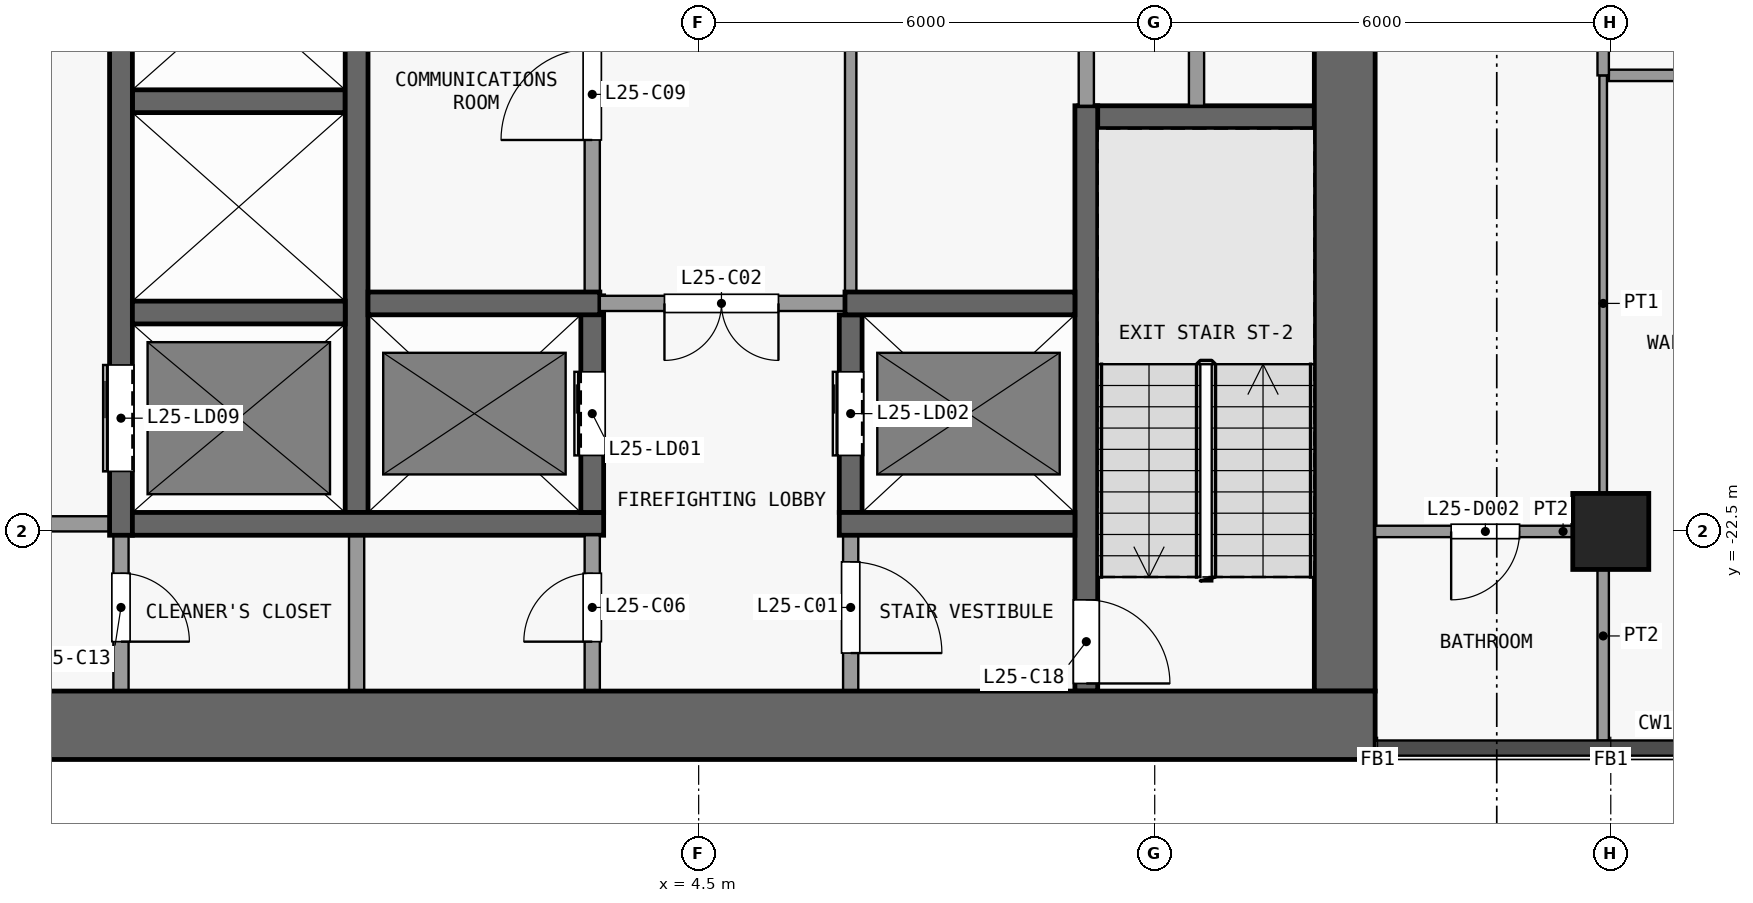
"""IFC4 building model, lengths in metres.
Left out: names, types, materials, properties, quantities, classifications, styles, units other than length and angle.
Written with IfcOpenShell. Run it as: python <this file> out.ifc"""

import sys

from ifc_helpers import new_model, si_unit, direction, frame, frame_2d, origin, origin_2d, place, context, subcontext, project, spatial, rectangle, extrude, element, fill, save


model = new_model("IFC4")
c1 = context("Model", 3, precision=1e-05, world=origin(), true_north=direction((0.0, 1.0)))
c2 = subcontext(c1, "Body", "Model", "MODEL_VIEW")
j1 = project(units=[si_unit("LENGTHUNIT", "METRE"), si_unit("PLANEANGLEUNIT", "RADIAN")], contexts=[c1])
p1 = place(None, origin())
s1 = spatial("IfcSite", under=j1, at=p1, CompositionType="ELEMENT")
p2 = place(p1, origin())
s2 = spatial("IfcBuilding", under=s1, at=p2, CompositionType="ELEMENT")
p3 = place(p2, frame((0.0, 0.0, 102.7)))
s3 = spatial("IfcBuildingStorey", under=s2, at=p3, CompositionType="ELEMENT", Elevation=102.7)
p4 = place(p3, frame((16.5, -22.5, 0.0), z_axis=(0.0, 0.0, 1.0), x_axis=(1.0, 0.0, 0.0)))
e1 = element("IfcColumn", 1, at=p4, inside=s3, PredefinedType="COLUMN", context=c2, shape_type="SweptSolid", body=[
    extrude(rectangle(XDim=1.0, YDim=1.0, at=origin_2d()), origin(), (0.0, 0.0, 1.0), 3.6),
])
p5 = place(p3, frame((-13.4, -25.05, 0.0), z_axis=(0.0, 0.0, 1.0), x_axis=(1.0, 0.0, 0.0)))
e2 = element("IfcWall", 2, at=p5, inside=s3, PredefinedType="SHEAR", context=c2, shape_type="SweptSolid", body=[
    extrude(rectangle(XDim=26.8, YDim=0.9, at=frame_2d((13.4, 0.0))), origin(), (0.0, 0.0, 1.0), 3.3),
])
p6 = place(p3, frame((13.0, -24.6, 0.0), z_axis=(0.0, 0.0, 1.0), x_axis=(0.0, 1.0, 0.0)))
e3 = element("IfcWall", 3, at=p6, inside=s3, PredefinedType="SHEAR", context=c2, shape_type="SweptSolid", body=[
    extrude(rectangle(XDim=16.1, YDim=0.8, at=frame_2d((8.05, 0.0))), origin(), (0.0, 0.0, 1.0), 3.3),
])
p7 = place(p3, frame((-3.25, -22.4, 0.0), z_axis=(0.0, 0.0, 1.0), x_axis=(-1.0, 0.0, 0.0)))
e4 = element("IfcWall", 4, at=p7, inside=s3, PredefinedType="PARTITIONING", context=c2, shape_type="SweptSolid", body=[
    extrude(rectangle(XDim=3.1, YDim=0.2, at=frame_2d((1.55, 0.0))), origin(), (0.0, 0.0, 1.0), 3.3),
])
p8 = place(p7, frame((0.8, 0.0, 0.0)))
e5 = element("IfcOpeningElement", 5, at=p8, cuts=e4, PredefinedType="OPENING", context=c2, shape_type="SweptSolid", body=[
    extrude(rectangle(XDim=1.5, YDim=2.1, at=frame_2d((0.75, 1.05))), frame((0.0, 0.11, 0.0), z_axis=(0.0, -1.0, 0.0), x_axis=(1.0, 0.0, 0.0)), (0.0, 0.0, 1.0), 0.22),
])
p9 = place(p3, frame((-2.95, -22.4, 0.0), z_axis=(0.0, 0.0, 1.0), x_axis=(1.0, 0.0, 0.0)))
e6 = element("IfcWall", 6, at=p9, inside=s3, PredefinedType="SHEAR", context=c2, shape_type="SweptSolid", body=[
    extrude(rectangle(XDim=6.2, YDim=0.3, at=frame_2d((3.1, 0.0))), origin(), (0.0, 0.0, 1.0), 3.3),
])
p10 = place(p3, frame((6.35, -22.4, 0.0), z_axis=(0.0, 0.0, 1.0), x_axis=(1.0, 0.0, 0.0)))
e7 = element("IfcWall", 7, at=p10, inside=s3, PredefinedType="SHEAR", context=c2, shape_type="SweptSolid", body=[
    extrude(rectangle(XDim=3.1, YDim=0.3, at=frame_2d((1.55, 0.0))), origin(), (0.0, 0.0, 1.0), 3.3),
])
p11 = place(p3, frame((-2.95, -19.62, 0.0), z_axis=(0.0, 0.0, 1.0), x_axis=(1.0, 0.0, 0.0)))
e8 = element("IfcWall", 8, at=p11, inside=s3, PredefinedType="SHEAR", context=c2, shape_type="SweptSolid", body=[
    extrude(rectangle(XDim=2.8, YDim=0.3, at=frame_2d((1.4, 0.0))), origin(), (0.0, 0.0, 1.0), 3.3),
])
p12 = place(p3, frame((0.15, -19.5, 0.0), z_axis=(0.0, 0.0, 1.0), x_axis=(1.0, 0.0, 0.0)))
e9 = element("IfcWall", 9, at=p12, inside=s3, PredefinedType="SHEAR", context=c2, shape_type="SweptSolid", body=[
    extrude(rectangle(XDim=3.05, YDim=0.3, at=frame_2d((1.525, 0.0))), origin(), (0.0, 0.0, 1.0), 3.3),
])
p13 = place(p3, frame((6.575, -19.5, 0.0), z_axis=(0.0, 0.0, 1.0), x_axis=(-1.0, 0.0, 0.0)))
e10 = element("IfcWall", 10, at=p13, inside=s3, PredefinedType="PARTITIONING", context=c2, shape_type="SweptSolid", body=[
    extrude(rectangle(XDim=3.375, YDim=0.2, at=frame_2d((1.688, 0.0))), origin(), (0.0, 0.0, 1.0), 3.3),
])
p14 = place(p13, frame((1.025, 0.0, 0.0)))
e11 = element("IfcOpeningElement", 11, at=p14, cuts=e10, PredefinedType="OPENING", context=c2, shape_type="SweptSolid", body=[
    extrude(rectangle(XDim=1.5, YDim=2.1, at=frame_2d((0.75, 1.05))), frame((0.0, 0.11, 0.0), z_axis=(0.0, -1.0, 0.0), x_axis=(1.0, 0.0, 0.0)), (0.0, 0.0, 1.0), 0.22),
])
p15 = place(p3, frame((6.425, -19.5, 0.0), z_axis=(0.0, 0.0, 1.0), x_axis=(1.0, 0.0, 0.0)))
e12 = element("IfcWall", 12, at=p15, inside=s3, PredefinedType="SHEAR", context=c2, shape_type="SweptSolid", body=[
    extrude(rectangle(XDim=3.025, YDim=0.3, at=frame_2d((1.512, 0.0))), origin(), (0.0, 0.0, 1.0), 3.3),
])
p16 = place(p3, frame((9.5, -17.05, 0.0), z_axis=(0.0, 0.0, 1.0), x_axis=(1.0, 0.0, 0.0)))
e13 = element("IfcWall", 13, at=p16, inside=s3, PredefinedType="SHEAR", context=c2, shape_type="SweptSolid", body=[
    extrude(rectangle(XDim=3.1, YDim=0.3, at=frame_2d((1.55, 0.0))), origin(), (0.0, 0.0, 1.0), 3.3),
])
p17 = place(p3, frame((-2.95, -16.84, 0.0), z_axis=(0.0, 0.0, 1.0), x_axis=(1.0, 0.0, 0.0)))
e14 = element("IfcWall", 14, at=p17, inside=s3, PredefinedType="SHEAR", context=c2, shape_type="SweptSolid", body=[
    extrude(rectangle(XDim=2.8, YDim=0.3, at=frame_2d((1.4, 0.0))), origin(), (0.0, 0.0, 1.0), 3.3),
])
p18 = place(p3, frame((-3.1, -22.55, 0.0), z_axis=(0.0, 0.0, 1.0), x_axis=(0.0, -1.0, 0.0)))
e15 = element("IfcWall", 15, at=p18, inside=s3, PredefinedType="PARTITIONING", context=c2, shape_type="SweptSolid", body=[
    extrude(rectangle(XDim=2.05, YDim=0.2, at=frame_2d((1.025, 0.0))), origin(), (0.0, 0.0, 1.0), 3.3),
])
p19 = place(p18, frame((0.5, 0.0, 0.0)))
e16 = element("IfcOpeningElement", 16, at=p19, cuts=e15, PredefinedType="OPENING", context=c2, shape_type="SweptSolid", body=[
    extrude(rectangle(XDim=0.9, YDim=2.1, at=frame_2d((0.45, 1.05))), frame((0.0, 0.11, 0.0), z_axis=(0.0, -1.0, 0.0), x_axis=(1.0, 0.0, 0.0)), (0.0, 0.0, 1.0), 0.22),
])
p20 = place(p3, frame((-3.1, -22.55, 0.0), z_axis=(0.0, 0.0, 1.0), x_axis=(0.0, 1.0, 0.0)))
e17 = element("IfcWall", 17, at=p20, inside=s3, PredefinedType="SHEAR", context=c2, shape_type="SweptSolid", body=[
    extrude(rectangle(XDim=14.05, YDim=0.3, at=frame_2d((7.025, 0.0))), origin(), (0.0, 0.0, 1.0), 3.3),
])
p21 = place(p20, frame((12.11, 0.0, 0.0)))
e18 = element("IfcOpeningElement", 18, at=p21, cuts=e17, PredefinedType="OPENING", context=c2, shape_type="SweptSolid", body=[
    extrude(rectangle(XDim=1.1, YDim=2.1, at=frame_2d((0.55, 1.05))), frame((0.0, 0.16, 0.0), z_axis=(0.0, -1.0, 0.0), x_axis=(1.0, 0.0, 0.0)), (0.0, 0.0, 1.0), 0.32),
])
p22 = place(p20, frame((0.84, 0.0, 0.0)))
e19 = element("IfcOpeningElement", 19, at=p22, cuts=e17, PredefinedType="OPENING", context=c2, shape_type="SweptSolid", body=[
    extrude(rectangle(XDim=1.4, YDim=2.1, at=frame_2d((0.7, 1.05))), frame((0.0, 0.16, 0.0), z_axis=(0.0, -1.0, 0.0), x_axis=(1.0, 0.0, 0.0)), (0.0, 0.0, 1.0), 0.32),
])
p23 = place(p3, frame((0.0, -24.6, 0.0), z_axis=(0.0, 0.0, 1.0), x_axis=(0.0, 1.0, 0.0)))
e20 = element("IfcWall", 20, at=p23, inside=s3, PredefinedType="PARTITIONING", context=c2, shape_type="SweptSolid", body=[
    extrude(rectangle(XDim=2.05, YDim=0.2, at=frame_2d((1.025, 0.0))), origin(), (0.0, 0.0, 1.0), 3.3),
])
p24 = place(p3, frame((0.0, -22.25, 0.0), z_axis=(0.0, 0.0, 1.0), x_axis=(0.0, 1.0, 0.0)))
e21 = element("IfcWall", 21, at=p24, inside=s3, PredefinedType="SHEAR", context=c2, shape_type="SweptSolid", body=[
    extrude(rectangle(XDim=13.75, YDim=0.3, at=frame_2d((6.875, 0.0))), origin(), (0.0, 0.0, 1.0), 3.3),
])
p25 = place(p3, frame((3.1, -24.6, 0.0), z_axis=(0.0, 0.0, 1.0), x_axis=(0.0, 1.0, 0.0)))
e22 = element("IfcWall", 22, at=p25, inside=s3, PredefinedType="PARTITIONING", context=c2, shape_type="SweptSolid", body=[
    extrude(rectangle(XDim=2.05, YDim=0.2, at=frame_2d((1.025, 0.0))), origin(), (0.0, 0.0, 1.0), 3.3),
])
p26 = place(p25, frame((0.65, 0.0, 0.0)))
e23 = element("IfcOpeningElement", 23, at=p26, cuts=e22, PredefinedType="OPENING", context=c2, shape_type="SweptSolid", body=[
    extrude(rectangle(XDim=0.9, YDim=2.1, at=frame_2d((0.45, 1.05))), frame((0.0, 0.11, 0.0), z_axis=(0.0, -1.0, 0.0), x_axis=(1.0, 0.0, 0.0)), (0.0, 0.0, 1.0), 0.22),
])
p27 = place(p3, frame((3.1, -22.25, 0.0), z_axis=(0.0, 0.0, 1.0), x_axis=(0.0, 1.0, 0.0)))
e24 = element("IfcWall", 24, at=p27, inside=s3, PredefinedType="SHEAR", context=c2, shape_type="SweptSolid", body=[
    extrude(rectangle(XDim=2.85, YDim=0.3, at=frame_2d((1.425, 0.0))), origin(), (0.0, 0.0, 1.0), 3.3),
])
p28 = place(p27, frame((0.75, 0.0, 0.0)))
e25 = element("IfcOpeningElement", 25, at=p28, cuts=e24, PredefinedType="OPENING", context=c2, shape_type="SweptSolid", body=[
    extrude(rectangle(XDim=1.1, YDim=2.1, at=frame_2d((0.55, 1.05))), frame((0.0, 0.16, 0.0), z_axis=(0.0, -1.0, 0.0), x_axis=(1.0, 0.0, 0.0)), (0.0, 0.0, 1.0), 0.32),
])
p29 = place(p3, frame((3.1, -19.6, 0.0), z_axis=(0.0, 0.0, 1.0), x_axis=(0.0, 1.0, 0.0)))
e26 = element("IfcWall", 26, at=p29, inside=s3, PredefinedType="PARTITIONING", context=c2, shape_type="SweptSolid", body=[
    extrude(rectangle(XDim=11.1, YDim=0.2, at=frame_2d((5.55, 0.0))), origin(), (0.0, 0.0, 1.0), 3.3),
])
p30 = place(p29, frame((2.25, 0.0, 0.0)))
e27 = element("IfcOpeningElement", 27, at=p30, cuts=e26, PredefinedType="OPENING", context=c2, shape_type="SweptSolid", body=[
    extrude(rectangle(XDim=1.2, YDim=2.1, at=frame_2d((0.6, 1.05))), frame((0.0, 0.11, 0.0), z_axis=(0.0, -1.0, 0.0), x_axis=(1.0, 0.0, 0.0)), (0.0, 0.0, 1.0), 0.22),
])
p31 = place(p29, frame((7.75, 0.0, 0.0)))
e28 = element("IfcOpeningElement", 28, at=p31, cuts=e26, PredefinedType="OPENING", context=c2, shape_type="SweptSolid", body=[
    extrude(rectangle(XDim=1.2, YDim=2.1, at=frame_2d((0.6, 1.05))), frame((0.0, 0.11, 0.0), z_axis=(0.0, -1.0, 0.0), x_axis=(1.0, 0.0, 0.0)), (0.0, 0.0, 1.0), 0.22),
])
p32 = place(p3, frame((6.5, -22.55, 0.0), z_axis=(0.0, 0.0, 1.0), x_axis=(0.0, -1.0, 0.0)))
e29 = element("IfcWall", 29, at=p32, inside=s3, PredefinedType="PARTITIONING", context=c2, shape_type="SweptSolid", body=[
    extrude(rectangle(XDim=2.05, YDim=0.2, at=frame_2d((1.025, 0.0))), origin(), (0.0, 0.0, 1.0), 3.3),
])
p33 = place(p32, frame((0.35, 0.0, 0.0)))
e30 = element("IfcOpeningElement", 30, at=p33, cuts=e29, PredefinedType="OPENING", context=c2, shape_type="SweptSolid", body=[
    extrude(rectangle(XDim=1.2, YDim=2.1, at=frame_2d((0.6, 1.05))), frame((0.0, 0.11, 0.0), z_axis=(0.0, -1.0, 0.0), x_axis=(1.0, 0.0, 0.0)), (0.0, 0.0, 1.0), 0.22),
])
p34 = place(p3, frame((6.5, -22.25, 0.0), z_axis=(0.0, 0.0, 1.0), x_axis=(0.0, 1.0, 0.0)))
e31 = element("IfcWall", 31, at=p34, inside=s3, PredefinedType="SHEAR", context=c2, shape_type="SweptSolid", body=[
    extrude(rectangle(XDim=2.6, YDim=0.3, at=frame_2d((1.3, 0.0))), origin(), (0.0, 0.0, 1.0), 3.3),
])
p35 = place(p34, frame((0.75, 0.0, 0.0)))
e32 = element("IfcOpeningElement", 32, at=p35, cuts=e31, PredefinedType="OPENING", context=c2, shape_type="SweptSolid", body=[
    extrude(rectangle(XDim=1.1, YDim=2.1, at=frame_2d((0.55, 1.05))), frame((0.0, 0.16, 0.0), z_axis=(0.0, -1.0, 0.0), x_axis=(1.0, 0.0, 0.0)), (0.0, 0.0, 1.0), 0.32),
])
p36 = place(p3, frame((6.5, -8.5, 0.0), z_axis=(0.0, 0.0, 1.0), x_axis=(0.0, -1.0, 0.0)))
e33 = element("IfcWall", 33, at=p36, inside=s3, PredefinedType="PARTITIONING", context=c2, shape_type="SweptSolid", body=[
    extrude(rectangle(XDim=10.85, YDim=0.15, at=frame_2d((5.425, 0.0))), origin(), (0.0, 0.0, 1.0), 3.3),
])
p37 = place(p36, frame((4.9, 0.0, 0.0)))
e34 = element("IfcOpeningElement", 34, at=p37, cuts=e33, PredefinedType="OPENING", context=c2, shape_type="SweptSolid", body=[
    extrude(rectangle(XDim=1.2, YDim=2.1, at=frame_2d((0.6, 1.05))), frame((0.0, 0.085, 0.0), z_axis=(0.0, -1.0, 0.0), x_axis=(1.0, 0.0, 0.0)), (0.0, 0.0, 1.0), 0.17),
])
p38 = place(p3, frame((9.6, -16.9, 0.0), z_axis=(0.0, 0.0, 1.0), x_axis=(0.0, -1.0, 0.0)))
e35 = element("IfcWall", 35, at=p38, inside=s3, PredefinedType="SHEAR", context=c2, shape_type="SweptSolid", body=[
    extrude(rectangle(XDim=7.7, YDim=0.3, at=frame_2d((3.85, 0.0))), origin(), (0.0, 0.0, 1.0), 3.3),
])
p39 = place(p38, frame((6.5, 0.0, 0.0)))
e36 = element("IfcOpeningElement", 36, at=p39, cuts=e35, PredefinedType="OPENING", context=c2, shape_type="SweptSolid", body=[
    extrude(rectangle(XDim=1.1, YDim=2.1, at=frame_2d((0.55, 1.05))), frame((0.0, 0.16, 0.0), z_axis=(0.0, -1.0, 0.0), x_axis=(1.0, 0.0, 0.0)), (0.0, 0.0, 1.0), 0.32),
])
p40 = place(p3, frame((9.6, -16.9, 0.0), z_axis=(0.0, 0.0, 1.0), x_axis=(0.0, 1.0, 0.0)))
e37 = element("IfcWall", 37, at=p40, inside=s3, PredefinedType="PARTITIONING", context=c2, shape_type="SweptSolid", body=[
    extrude(rectangle(XDim=8.4, YDim=0.2, at=frame_2d((4.2, 0.0))), origin(), (0.0, 0.0, 1.0), 3.3),
])
p41 = place(p3, frame((11.05, -13.2, 0.0), z_axis=(0.0, 0.0, 1.0), x_axis=(0.0, -1.0, 0.0)))
e38 = element("IfcWall", 38, at=p41, inside=s3, PredefinedType="PARTITIONING", context=c2, shape_type="SweptSolid", body=[
    extrude(rectangle(XDim=3.7, YDim=0.2, at=frame_2d((1.85, 0.0))), origin(), (0.0, 0.0, 1.0), 3.3),
])
p42 = place(p41, frame((1.525, 0.0, 0.0)))
e39 = element("IfcOpeningElement", 39, at=p42, cuts=e38, PredefinedType="OPENING", context=c2, shape_type="SweptSolid", body=[
    extrude(rectangle(XDim=0.9, YDim=2.1, at=frame_2d((0.45, 1.05))), frame((0.0, 0.11, 0.0), z_axis=(0.0, -1.0, 0.0), x_axis=(1.0, 0.0, 0.0)), (0.0, 0.0, 1.0), 0.22),
])
p43 = place(p3, frame((13.4, -22.5, 0.0), z_axis=(0.0, 0.0, 1.0), x_axis=(1.0, 0.0, 0.0)))
e40 = element("IfcWall", 40, at=p43, inside=s3, PredefinedType="PARTITIONING", context=c2, shape_type="SweptSolid", body=[
    extrude(rectangle(XDim=2.925, YDim=0.15, at=frame_2d((1.462, 0.0))), origin(), (0.0, 0.0, 1.0), 3.3),
])
p44 = place(p43, frame((1.0, 0.0, 0.0)))
e41 = element("IfcOpeningElement", 41, at=p44, cuts=e40, PredefinedType="OPENING", context=c2, shape_type="SweptSolid", body=[
    extrude(rectangle(XDim=0.9, YDim=2.1, at=frame_2d((0.45, 1.05))), frame((0.0, 0.085, 0.0), z_axis=(0.0, -1.0, 0.0), x_axis=(1.0, 0.0, 0.0)), (0.0, 0.0, 1.0), 0.17),
])
p45 = place(p3, frame((16.475, -16.5, 0.0), z_axis=(0.0, 0.0, 1.0), x_axis=(1.0, 0.0, 0.0)))
e42 = element("IfcWall", 42, at=p45, inside=s3, PredefinedType="PARTITIONING", context=c2, shape_type="SweptSolid", body=[
    extrude(rectangle(XDim=3.45, YDim=0.15, at=frame_2d((1.725, 0.0))), origin(), (0.0, 0.0, 1.0), 3.3),
])
p46 = place(p3, frame((16.4, -22.5, 0.0), z_axis=(0.0, 0.0, 1.0), x_axis=(0.0, 1.0, 0.0)))
e43 = element("IfcWall", 43, at=p46, inside=s3, PredefinedType="PARTITIONING", context=c2, shape_type="SweptSolid", body=[
    extrude(rectangle(XDim=6.0, YDim=0.1, at=frame_2d((3.0, 0.0))), origin(), (0.0, 0.0, 1.0), 3.3),
])
p47 = place(p3, frame((16.4, -25.25, 0.0), z_axis=(0.0, 0.0, 1.0), x_axis=(0.0, 1.0, 0.0)))
e44 = element("IfcWall", 44, at=p47, inside=s3, PredefinedType="PARTITIONING", context=c2, shape_type="SweptSolid", body=[
    extrude(rectangle(XDim=2.75, YDim=0.15, at=frame_2d((1.375, 0.0))), origin(), (0.0, 0.0, 1.0), 3.3),
])
p48 = place(p3, frame((16.4, -16.5, 0.0), z_axis=(0.0, 0.0, 1.0), x_axis=(0.0, 1.0, 0.0)))
e45 = element("IfcWall", 45, at=p48, inside=s3, PredefinedType="PARTITIONING", context=c2, shape_type="SweptSolid", body=[
    extrude(rectangle(XDim=8.5, YDim=0.15, at=frame_2d((4.25, 0.0))), origin(), (0.0, 0.0, 1.0), 3.3),
])
p49 = place(p48, frame((5.3, 0.0, 0.0)))
e46 = element("IfcOpeningElement", 46, at=p49, cuts=e45, PredefinedType="OPENING", context=c2, shape_type="SweptSolid", body=[
    extrude(rectangle(XDim=0.9, YDim=2.1, at=frame_2d((0.45, 1.05))), frame((0.0, 0.085, 0.0), z_axis=(0.0, -1.0, 0.0), x_axis=(1.0, 0.0, 0.0)), (0.0, 0.0, 1.0), 0.17),
])
p50 = place(p28, origin())
e47 = element("IfcDoor", 47, at=p50, inside=s3, OperationType="DOUBLE_DOOR_SLIDING", PredefinedType="DOOR", context=c2, shape_type="SweptSolid", body=[
    extrude(rectangle(XDim=1.1, YDim=2.1, at=frame_2d((0.55, 1.05))), frame((0.0, 0.025, 0.0), z_axis=(0.0, -1.0, 0.0), x_axis=(1.0, 0.0, 0.0)), (0.0, 0.0, 1.0), 0.05),
])
fill(e25, e47)
p51 = place(p35, origin())
e48 = element("IfcDoor", 48, at=p51, inside=s3, OperationType="DOUBLE_DOOR_SLIDING", PredefinedType="DOOR", context=c2, shape_type="SweptSolid", body=[
    extrude(rectangle(XDim=1.1, YDim=2.1, at=frame_2d((0.55, 1.05))), frame((0.0, 0.025, 0.0), z_axis=(0.0, -1.0, 0.0), x_axis=(1.0, 0.0, 0.0)), (0.0, 0.0, 1.0), 0.05),
])
fill(e32, e48)
p52 = place(p22, origin())
e49 = element("IfcDoor", 49, at=p52, inside=s3, OperationType="DOUBLE_DOOR_SLIDING", PredefinedType="DOOR", context=c2, shape_type="SweptSolid", body=[
    extrude(rectangle(XDim=1.4, YDim=2.1, at=frame_2d((0.7, 1.05))), frame((0.0, 0.025, 0.0), z_axis=(0.0, -1.0, 0.0), x_axis=(1.0, 0.0, 0.0)), (0.0, 0.0, 1.0), 0.05),
])
fill(e19, e49)
p53 = place(p33, origin())
e50 = element("IfcDoor", 50, at=p53, inside=s3, OperationType="SINGLE_SWING_RIGHT", PredefinedType="DOOR", context=c2, shape_type="SweptSolid", body=[
    extrude(rectangle(XDim=1.2, YDim=2.1, at=frame_2d((0.6, 1.05))), frame((0.0, 0.025, 0.0), z_axis=(0.0, -1.0, 0.0), x_axis=(1.0, 0.0, 0.0)), (0.0, 0.0, 1.0), 0.05),
])
fill(e30, e50)
p54 = place(p14, origin())
e51 = element("IfcDoor", 51, at=p54, inside=s3, OperationType="DOUBLE_DOOR_SINGLE_SWING", PredefinedType="DOOR", context=c2, shape_type="SweptSolid", body=[
    extrude(rectangle(XDim=1.5, YDim=2.1, at=frame_2d((0.75, 1.05))), frame((0.0, 0.025, 0.0), z_axis=(0.0, -1.0, 0.0), x_axis=(1.0, 0.0, 0.0)), (0.0, 0.0, 1.0), 0.05),
])
fill(e11, e51)
p55 = place(p26, origin())
e52 = element("IfcDoor", 52, at=p55, inside=s3, OperationType="SINGLE_SWING_LEFT", PredefinedType="DOOR", context=c2, shape_type="SweptSolid", body=[
    extrude(rectangle(XDim=0.9, YDim=2.1, at=frame_2d((0.45, 1.05))), frame((0.0, 0.025, 0.0), z_axis=(0.0, -1.0, 0.0), x_axis=(1.0, 0.0, 0.0)), (0.0, 0.0, 1.0), 0.05),
])
fill(e23, e52)
p56 = place(p30, origin())
e53 = element("IfcDoor", 53, at=p56, inside=s3, OperationType="SINGLE_SWING_LEFT", PredefinedType="DOOR", context=c2, shape_type="SweptSolid", body=[
    extrude(rectangle(XDim=1.2, YDim=2.1, at=frame_2d((0.6, 1.05))), frame((0.0, 0.025, 0.0), z_axis=(0.0, -1.0, 0.0), x_axis=(1.0, 0.0, 0.0)), (0.0, 0.0, 1.0), 0.05),
])
fill(e27, e53)
p57 = place(p19, origin())
e54 = element("IfcDoor", 54, at=p57, inside=s3, OperationType="SINGLE_SWING_RIGHT", PredefinedType="DOOR", context=c2, shape_type="SweptSolid", body=[
    extrude(rectangle(XDim=0.9, YDim=2.1, at=frame_2d((0.45, 1.05))), frame((0.0, 0.025, 0.0), z_axis=(0.0, -1.0, 0.0), x_axis=(1.0, 0.0, 0.0)), (0.0, 0.0, 1.0), 0.05),
])
fill(e16, e54)
p58 = place(p39, origin())
e55 = element("IfcDoor", 55, at=p58, inside=s3, OperationType="SINGLE_SWING_RIGHT", PredefinedType="DOOR", context=c2, shape_type="SweptSolid", body=[
    extrude(rectangle(XDim=1.1, YDim=2.1, at=frame_2d((0.55, 1.05))), frame((0.0, 0.025, 0.0), z_axis=(0.0, -1.0, 0.0), x_axis=(1.0, 0.0, 0.0)), (0.0, 0.0, 1.0), 0.05),
])
fill(e36, e55)
p59 = place(p44, origin())
e56 = element("IfcDoor", 56, at=p59, inside=s3, OperationType="SINGLE_SWING_LEFT", PredefinedType="DOOR", context=c2, shape_type="SweptSolid", body=[
    extrude(rectangle(XDim=0.9, YDim=2.1, at=frame_2d((0.45, 1.05))), frame((0.0, 0.025, 0.0), z_axis=(0.0, -1.0, 0.0), x_axis=(1.0, 0.0, 0.0)), (0.0, 0.0, 1.0), 0.05),
])
fill(e41, e56)
save(model, sys.argv[1])
